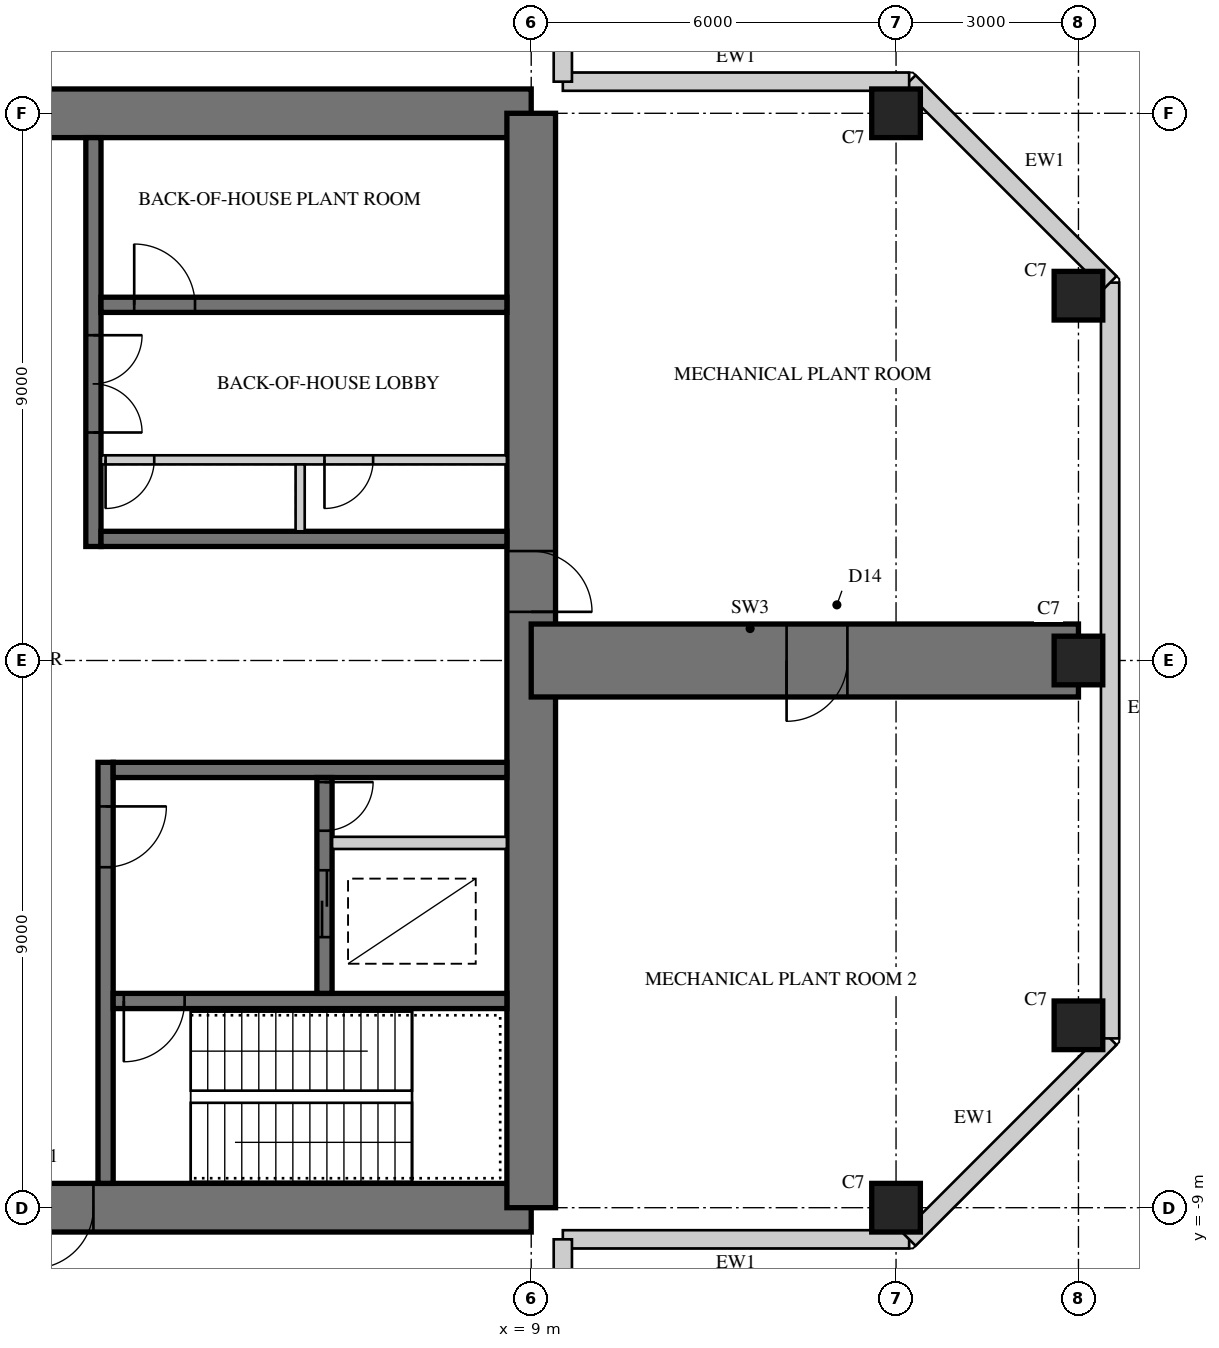
"""IFC4 building model, lengths in metres.
Left out: names, types, materials, properties, quantities, classifications, styles, units other than length and angle.
Written with IfcOpenShell. Run it as: python <this file> out.ifc"""

import sys

from ifc_helpers import new_model, si_unit, direction, frame, frame_2d, origin, origin_2d, place, context, subcontext, project, spatial, rectangle, extrude, element, fill, save


model = new_model("IFC4")
c1 = context("Model", 3, precision=1e-05, world=origin(), true_north=direction((0.0, 1.0)))
c2 = subcontext(c1, "Body", "Model", "MODEL_VIEW")
j1 = project(units=[si_unit("LENGTHUNIT", "METRE"), si_unit("PLANEANGLEUNIT", "RADIAN")], contexts=[c1])
p1 = place(None, origin())
s1 = spatial("IfcSite", under=j1, at=p1, CompositionType="ELEMENT")
p2 = place(p1, origin())
s2 = spatial("IfcBuilding", under=s1, at=p2, CompositionType="ELEMENT")
p3 = place(p2, frame((0.0, 0.0, 252.7)))
s3 = spatial("IfcBuildingStorey", under=s2, at=p3, CompositionType="ELEMENT", Elevation=252.7)
p4 = place(p3, frame((9.0, 9.0, 0.0), z_axis=(0.0, 0.0, 1.0), x_axis=(-1.0, 0.0, 0.0)))
e1 = element("IfcWall", 1, at=p4, inside=s3, PredefinedType="SHEAR", context=c2, shape_type="SweptSolid", body=[
    extrude(rectangle(XDim=18.0, YDim=0.8, at=frame_2d((9.0, 0.0))), origin(), (0.0, 0.0, 1.0), 5.0),
])
p5 = place(p4, frame((9.8, 0.0, 0.0)))
e2 = element("IfcOpeningElement", 2, at=p5, cuts=e1, PredefinedType="OPENING", context=c2, shape_type="SweptSolid", body=[
    extrude(rectangle(XDim=1.0, YDim=2.4, at=frame_2d((0.5, 1.2))), frame((0.0, 0.41, 0.0), z_axis=(0.0, -1.0, 0.0), x_axis=(1.0, 0.0, 0.0)), (0.0, 0.0, 1.0), 0.82),
])
p6 = place(p3, frame((-9.0, -9.0, 0.0), z_axis=(0.0, 0.0, 1.0), x_axis=(1.0, 0.0, 0.0)))
e3 = element("IfcWall", 3, at=p6, inside=s3, PredefinedType="SHEAR", context=c2, shape_type="SweptSolid", body=[
    extrude(rectangle(XDim=18.0, YDim=0.8, at=frame_2d((9.0, 0.0))), origin(), (0.0, 0.0, 1.0), 5.0),
])
p7 = place(p6, frame((9.8, 0.0, 0.0)))
e4 = element("IfcOpeningElement", 4, at=p7, cuts=e3, PredefinedType="OPENING", context=c2, shape_type="SweptSolid", body=[
    extrude(rectangle(XDim=1.0, YDim=2.4, at=frame_2d((0.5, 1.2))), frame((0.0, 0.41, 0.0), z_axis=(0.0, -1.0, 0.0), x_axis=(1.0, 0.0, 0.0)), (0.0, 0.0, 1.0), 0.82),
])
p8 = place(p3, frame((9.0, -9.0, 0.0), z_axis=(0.0, 0.0, 1.0), x_axis=(0.0, 1.0, 0.0)))
e5 = element("IfcWall", 5, at=p8, inside=s3, PredefinedType="SHEAR", context=c2, shape_type="SweptSolid", body=[
    extrude(rectangle(XDim=18.0, YDim=0.8, at=frame_2d((9.0, 0.0))), origin(), (0.0, 0.0, 1.0), 5.0),
])
p9 = place(p8, frame((9.8, 0.0, 0.0)))
e6 = element("IfcOpeningElement", 6, at=p9, cuts=e5, PredefinedType="OPENING", context=c2, shape_type="SweptSolid", body=[
    extrude(rectangle(XDim=1.0, YDim=2.4, at=frame_2d((0.5, 1.2))), frame((0.0, 0.41, 0.0), z_axis=(0.0, -1.0, 0.0), x_axis=(1.0, 0.0, 0.0)), (0.0, 0.0, 1.0), 0.82),
])
p10 = place(p3, frame((1.8, 1.875, 0.0), z_axis=(0.0, 0.0, 1.0), x_axis=(0.0, 1.0, 0.0)))
e7 = element("IfcWall", 7, at=p10, inside=s3, PredefinedType="SHEAR", context=c2, shape_type="SweptSolid", body=[
    extrude(rectangle(XDim=6.725, YDim=0.25, at=frame_2d((3.363, 0.0))), origin(), (0.0, 0.0, 1.0), 5.0),
])
p11 = place(p10, frame((1.875, 0.0, 0.0)))
e8 = element("IfcOpeningElement", 8, at=p11, cuts=e7, PredefinedType="OPENING", context=c2, shape_type="SweptSolid", body=[
    extrude(rectangle(XDim=1.6, YDim=2.4, at=frame_2d((0.8, 1.2))), frame((0.0, 0.135, 0.0), z_axis=(0.0, -1.0, 0.0), x_axis=(1.0, 0.0, 0.0)), (0.0, 0.0, 1.0), 0.27),
])
p12 = place(p3, frame((1.925, 2.0, 0.0), z_axis=(0.0, 0.0, 1.0), x_axis=(1.0, 0.0, 0.0)))
e9 = element("IfcWall", 9, at=p12, inside=s3, PredefinedType="SHEAR", context=c2, shape_type="SweptSolid", body=[
    extrude(rectangle(XDim=6.675, YDim=0.25, at=frame_2d((3.337, 0.0))), origin(), (0.0, 0.0, 1.0), 5.0),
])
p13 = place(p3, frame((1.925, 5.85, 0.0), z_axis=(0.0, 0.0, 1.0), x_axis=(1.0, 0.0, 0.0)))
e10 = element("IfcWall", 10, at=p13, inside=s3, PredefinedType="SHEAR", context=c2, shape_type="SweptSolid", body=[
    extrude(rectangle(XDim=6.675, YDim=0.25, at=frame_2d((3.337, 0.0))), origin(), (0.0, 0.0, 1.0), 5.0),
])
p14 = place(p13, frame((0.546, 0.0, 0.0)))
e11 = element("IfcOpeningElement", 11, at=p14, cuts=e10, PredefinedType="OPENING", context=c2, shape_type="SweptSolid", body=[
    extrude(rectangle(XDim=1.0, YDim=2.1, at=frame_2d((0.5, 1.05))), frame((0.0, 0.135, 0.0), z_axis=(0.0, -1.0, 0.0), x_axis=(1.0, 0.0, 0.0)), (0.0, 0.0, 1.0), 0.27),
])
p15 = place(p3, frame((1.925, 3.3, 0.0), z_axis=(0.0, 0.0, 1.0), x_axis=(1.0, 0.0, 0.0)))
e12 = element("IfcWall", 12, at=p15, inside=s3, PredefinedType="PARTITIONING", context=c2, shape_type="SweptSolid", body=[
    extrude(rectangle(XDim=6.675, YDim=0.15, at=frame_2d((3.337, 0.0))), origin(), (0.0, 0.0, 1.0), 5.0),
])
p16 = place(p15, frame((0.075, 0.0, 0.0)))
e13 = element("IfcOpeningElement", 13, at=p16, cuts=e12, PredefinedType="OPENING", context=c2, shape_type="SweptSolid", body=[
    extrude(rectangle(XDim=0.8, YDim=2.1, at=frame_2d((0.4, 1.05))), frame((0.0, 0.085, 0.0), z_axis=(0.0, -1.0, 0.0), x_axis=(1.0, 0.0, 0.0)), (0.0, 0.0, 1.0), 0.17),
])
p17 = place(p15, frame((3.675, 0.0, 0.0)))
e14 = element("IfcOpeningElement", 14, at=p17, cuts=e12, PredefinedType="OPENING", context=c2, shape_type="SweptSolid", body=[
    extrude(rectangle(XDim=0.8, YDim=2.1, at=frame_2d((0.4, 1.05))), frame((0.0, 0.085, 0.0), z_axis=(0.0, -1.0, 0.0), x_axis=(1.0, 0.0, 0.0)), (0.0, 0.0, 1.0), 0.17),
])
p18 = place(p3, frame((5.2, 2.125, 0.0), z_axis=(0.0, 0.0, 1.0), x_axis=(0.0, 1.0, 0.0)))
e15 = element("IfcWall", 15, at=p18, inside=s3, PredefinedType="PARTITIONING", context=c2, shape_type="SweptSolid", body=[
    extrude(rectangle(XDim=1.1, YDim=0.15, at=frame_2d((0.55, 0.0))), origin(), (0.0, 0.0, 1.0), 5.0),
])
p19 = place(p3, frame((2.0, -1.675, 0.0), z_axis=(0.0, 0.0, 1.0), x_axis=(0.0, -1.0, 0.0)))
e16 = element("IfcWall", 16, at=p19, inside=s3, PredefinedType="SHEAR", context=c2, shape_type="SweptSolid", body=[
    extrude(rectangle(XDim=6.925, YDim=0.25, at=frame_2d((3.462, 0.0))), origin(), (0.0, 0.0, 1.0), 5.0),
])
p20 = place(p19, frame((0.725, 0.0, 0.0)))
e17 = element("IfcOpeningElement", 17, at=p20, cuts=e16, PredefinedType="OPENING", context=c2, shape_type="SweptSolid", body=[
    extrude(rectangle(XDim=1.0, YDim=2.1, at=frame_2d((0.5, 1.05))), frame((0.0, 0.135, 0.0), z_axis=(0.0, -1.0, 0.0), x_axis=(1.0, 0.0, 0.0)), (0.0, 0.0, 1.0), 0.27),
])
p21 = place(p3, frame((2.125, -1.8, 0.0), z_axis=(0.0, 0.0, 1.0), x_axis=(1.0, 0.0, 0.0)))
e18 = element("IfcWall", 18, at=p21, inside=s3, PredefinedType="SHEAR", context=c2, shape_type="SweptSolid", body=[
    extrude(rectangle(XDim=6.475, YDim=0.25, at=frame_2d((3.238, 0.0))), origin(), (0.0, 0.0, 1.0), 5.0),
])
p22 = place(p3, frame((2.125, -5.6, 0.0), z_axis=(0.0, 0.0, 1.0), x_axis=(1.0, 0.0, 0.0)))
e19 = element("IfcWall", 19, at=p22, inside=s3, PredefinedType="SHEAR", context=c2, shape_type="SweptSolid", body=[
    extrude(rectangle(XDim=6.475, YDim=0.25, at=frame_2d((3.238, 0.0))), origin(), (0.0, 0.0, 1.0), 5.0),
])
p23 = place(p22, frame((0.175, 0.0, 0.0)))
e20 = element("IfcOpeningElement", 20, at=p23, cuts=e19, PredefinedType="OPENING", context=c2, shape_type="SweptSolid", body=[
    extrude(rectangle(XDim=1.0, YDim=2.1, at=frame_2d((0.5, 1.05))), frame((0.0, 0.135, 0.0), z_axis=(0.0, -1.0, 0.0), x_axis=(1.0, 0.0, 0.0)), (0.0, 0.0, 1.0), 0.27),
])
p24 = place(p3, frame((5.6, -1.925, 0.0), z_axis=(0.0, 0.0, 1.0), x_axis=(0.0, -1.0, 0.0)))
e21 = element("IfcWall", 21, at=p24, inside=s3, PredefinedType="SHEAR", context=c2, shape_type="SweptSolid", body=[
    extrude(rectangle(XDim=3.55, YDim=0.25, at=frame_2d((1.775, 0.0))), origin(), (0.0, 0.0, 1.0), 5.0),
])
p25 = place(p24, frame((1.525, 0.0, 0.0)))
e22 = element("IfcOpeningElement", 22, at=p25, cuts=e21, PredefinedType="OPENING", context=c2, shape_type="SweptSolid", body=[
    extrude(rectangle(XDim=1.1, YDim=2.2, at=frame_2d((0.55, 1.1))), frame((0.0, 0.135, 0.0), z_axis=(0.0, -1.0, 0.0), x_axis=(1.0, 0.0, 0.0)), (0.0, 0.0, 1.0), 0.27),
])
p26 = place(p24, frame((0.075, 0.0, 0.0)))
e23 = element("IfcOpeningElement", 23, at=p26, cuts=e21, PredefinedType="OPENING", context=c2, shape_type="SweptSolid", body=[
    extrude(rectangle(XDim=0.8, YDim=2.1, at=frame_2d((0.4, 1.05))), frame((0.0, 0.135, 0.0), z_axis=(0.0, -1.0, 0.0), x_axis=(1.0, 0.0, 0.0)), (0.0, 0.0, 1.0), 0.27),
])
p27 = place(p3, frame((5.725, -3.0, 0.0), z_axis=(0.0, 0.0, 1.0), x_axis=(1.0, 0.0, 0.0)))
e24 = element("IfcWall", 24, at=p27, inside=s3, PredefinedType="PARTITIONING", context=c2, shape_type="SweptSolid", body=[
    extrude(rectangle(XDim=2.875, YDim=0.2, at=frame_2d((1.438, 0.0))), origin(), (0.0, 0.0, 1.0), 5.0),
])
p28 = place(p3, frame((9.0, 0.0, 0.0), z_axis=(0.0, 0.0, 1.0), x_axis=(1.0, 0.0, 0.0)))
e25 = element("IfcWall", 25, at=p28, inside=s3, PredefinedType="SHEAR", context=c2, shape_type="SweptSolid", body=[
    extrude(rectangle(XDim=9.0, YDim=1.2, at=frame_2d((4.5, 0.0))), origin(), (0.0, 0.0, 1.0), 5.0),
])
p29 = place(p28, frame((4.2, 0.0, 0.0)))
e26 = element("IfcOpeningElement", 26, at=p29, cuts=e25, PredefinedType="OPENING", context=c2, shape_type="SweptSolid", body=[
    extrude(rectangle(XDim=1.0, YDim=2.2, at=frame_2d((0.5, 1.1))), frame((0.0, 0.61, 0.0), z_axis=(0.0, -1.0, 0.0), x_axis=(1.0, 0.0, 0.0)), (0.0, 0.0, 1.0), 1.22),
])
for number, where, z_axis, x_axis in (
    (27, (15.0, -9.0, 0.0), (0.0, 0.0, 1.0), (1.0, 0.0, 0.0)),
    (28, (15.0, 9.0, 0.0), (0.0, 0.0, 1.0), (1.0, 0.0, 0.0)),
    (29, (18.0, -6.0, 0.0), (0.0, 0.0, 1.0), (1.0, 0.0, 0.0)),
    (30, (18.0, 0.0, 0.0), (0.0, 0.0, 1.0), (1.0, 0.0, 0.0)),
    (31, (18.0, 6.0, 0.0), (0.0, 0.0, 1.0), (1.0, 0.0, 0.0)),
):
    element("IfcColumn", number, at=place(p3, frame(where, z_axis=z_axis, x_axis=x_axis)), inside=s3, PredefinedType="COLUMN", context=c2, shape_type="SweptSolid", body=[
        extrude(rectangle(XDim=0.8, YDim=0.8, at=origin_2d()), origin(), (0.0, 0.0, 1.0), 5.0),
    ])
p30 = place(p3, frame((9.52, -9.52, 0.0), z_axis=(0.0, 0.0, 1.0), x_axis=(1.0, 0.0, 0.0)))
e32 = element("IfcWall", 32, at=p30, inside=s3, PredefinedType="SOLIDWALL", context=c2, shape_type="SweptSolid", body=[
    extrude(rectangle(XDim=5.695, YDim=0.3, at=frame_2d((2.848, 0.0))), origin(), (0.0, 0.0, 1.0), 4.82),
])
p31 = place(p3, frame((15.215, -9.52, 0.0), z_axis=(0.0, 0.0, 1.0), x_axis=(0.707106781187, 0.707106781187, 0.0)))
e33 = element("IfcWall", 33, at=p31, inside=s3, PredefinedType="SOLIDWALL", context=c2, shape_type="SweptSolid", body=[
    extrude(rectangle(XDim=4.674, YDim=0.3, at=frame_2d((2.337, 0.0))), origin(), (0.0, 0.0, 1.0), 4.82),
])
p32 = place(p3, frame((18.52, -6.215, 0.0), z_axis=(0.0, 0.0, 1.0), x_axis=(0.0, 1.0, 0.0)))
e34 = element("IfcWall", 34, at=p32, inside=s3, PredefinedType="SOLIDWALL", context=c2, shape_type="SweptSolid", body=[
    extrude(rectangle(XDim=12.431, YDim=0.3, at=frame_2d((6.215, 0.0))), origin(), (0.0, 0.0, 1.0), 4.82),
])
p33 = place(p3, frame((18.52, 6.215, 0.0), z_axis=(0.0, 0.0, 1.0), x_axis=(-0.707106781187, 0.707106781187, 0.0)))
e35 = element("IfcWall", 35, at=p33, inside=s3, PredefinedType="SOLIDWALL", context=c2, shape_type="SweptSolid", body=[
    extrude(rectangle(XDim=4.674, YDim=0.3, at=frame_2d((2.337, 0.0))), origin(), (0.0, 0.0, 1.0), 4.82),
])
for number, where, z_axis, x_axis in (
    (36, (15.215, 9.52, 0.0), (0.0, 0.0, 1.0), (-1.0, 0.0, 0.0)),
    (37, (9.52, 9.52, 0.0), (0.0, 0.0, 1.0), (0.0, 1.0, 0.0)),
    (38, (9.52, -15.215, 0.0), (0.0, 0.0, 1.0), (0.0, 1.0, 0.0)),
):
    element("IfcWall", number, at=place(p3, frame(where, z_axis=z_axis, x_axis=x_axis)), inside=s3, PredefinedType="SOLIDWALL", context=c2, shape_type="SweptSolid", body=[
        extrude(rectangle(XDim=5.695, YDim=0.3, at=frame_2d((2.848, 0.0))), origin(), (0.0, 0.0, 1.0), 4.82),
    ])
p34 = place(p29, frame((1.0, 0.0, 0.0), z_axis=(0.0, 0.0, 1.0), x_axis=(-1.0, 0.0, 0.0)))
e39 = element("IfcDoor", 39, at=p34, inside=s3, OperationType="SINGLE_SWING_RIGHT", PredefinedType="DOOR", context=c2, shape_type="SweptSolid", body=[
    extrude(rectangle(XDim=1.0, YDim=2.2, at=frame_2d((0.5, 1.1))), frame((0.0, 0.025, 0.0), z_axis=(0.0, -1.0, 0.0), x_axis=(1.0, 0.0, 0.0)), (0.0, 0.0, 1.0), 0.05),
])
fill(e26, e39)
p35 = place(p7, frame((1.0, 0.0, 0.0), z_axis=(0.0, 0.0, 1.0), x_axis=(-1.0, 0.0, 0.0)))
e40 = element("IfcDoor", 40, at=p35, inside=s3, OperationType="SINGLE_SWING_RIGHT", PredefinedType="DOOR", context=c2, shape_type="SweptSolid", body=[
    extrude(rectangle(XDim=1.0, YDim=2.4, at=frame_2d((0.5, 1.2))), frame((0.0, -0.005, 0.0), z_axis=(0.0, -1.0, 0.0), x_axis=(1.0, 0.0, 0.0)), (0.0, 0.0, 1.0), 0.05),
])
fill(e4, e40)
p36 = place(p9, frame((1.0, 0.0, 0.0), z_axis=(0.0, 0.0, 1.0), x_axis=(-1.0, 0.0, 0.0)))
e41 = element("IfcDoor", 41, at=p36, inside=s3, OperationType="SINGLE_SWING_RIGHT", PredefinedType="DOOR", context=c2, shape_type="SweptSolid", body=[
    extrude(rectangle(XDim=1.0, YDim=2.4, at=frame_2d((0.5, 1.2))), frame((0.0, -0.005, 0.0), z_axis=(0.0, -1.0, 0.0), x_axis=(1.0, 0.0, 0.0)), (0.0, 0.0, 1.0), 0.05),
])
fill(e6, e41)
p37 = place(p11, frame((1.6, 0.0, 0.0), z_axis=(0.0, 0.0, 1.0), x_axis=(-1.0, 0.0, 0.0)))
e42 = element("IfcDoor", 42, at=p37, inside=s3, OperationType="DOUBLE_DOOR_SINGLE_SWING", PredefinedType="DOOR", context=c2, shape_type="SweptSolid", body=[
    extrude(rectangle(XDim=1.6, YDim=2.4, at=frame_2d((0.8, 1.2))), frame((0.0, 0.025, 0.0), z_axis=(0.0, -1.0, 0.0), x_axis=(1.0, 0.0, 0.0)), (0.0, 0.0, 1.0), 0.05),
])
fill(e8, e42)
p38 = place(p16, frame((0.8, 0.0, 0.0), z_axis=(0.0, 0.0, 1.0), x_axis=(-1.0, 0.0, 0.0)))
e43 = element("IfcDoor", 43, at=p38, inside=s3, OperationType="SINGLE_SWING_RIGHT", PredefinedType="DOOR", context=c2, shape_type="SweptSolid", body=[
    extrude(rectangle(XDim=0.8, YDim=2.1, at=frame_2d((0.4, 1.05))), frame((0.0, 0.025, 0.0), z_axis=(0.0, -1.0, 0.0), x_axis=(1.0, 0.0, 0.0)), (0.0, 0.0, 1.0), 0.05),
])
fill(e13, e43)
p39 = place(p17, frame((0.8, 0.0, 0.0), z_axis=(0.0, 0.0, 1.0), x_axis=(-1.0, 0.0, 0.0)))
e44 = element("IfcDoor", 44, at=p39, inside=s3, OperationType="SINGLE_SWING_RIGHT", PredefinedType="DOOR", context=c2, shape_type="SweptSolid", body=[
    extrude(rectangle(XDim=0.8, YDim=2.1, at=frame_2d((0.4, 1.05))), frame((0.0, 0.025, 0.0), z_axis=(0.0, -1.0, 0.0), x_axis=(1.0, 0.0, 0.0)), (0.0, 0.0, 1.0), 0.05),
])
fill(e14, e44)
p40 = place(p20, origin())
e45 = element("IfcDoor", 45, at=p40, inside=s3, OperationType="SINGLE_SWING_LEFT", PredefinedType="DOOR", context=c2, shape_type="SweptSolid", body=[
    extrude(rectangle(XDim=1.0, YDim=2.1, at=frame_2d((0.5, 1.05))), frame((0.0, 0.025, 0.0), z_axis=(0.0, -1.0, 0.0), x_axis=(1.0, 0.0, 0.0)), (0.0, 0.0, 1.0), 0.05),
])
fill(e17, e45)
p41 = place(p23, frame((1.0, 0.0, 0.0), z_axis=(0.0, 0.0, 1.0), x_axis=(-1.0, 0.0, 0.0)))
e46 = element("IfcDoor", 46, at=p41, inside=s3, OperationType="SINGLE_SWING_RIGHT", PredefinedType="DOOR", context=c2, shape_type="SweptSolid", body=[
    extrude(rectangle(XDim=1.0, YDim=2.1, at=frame_2d((0.5, 1.05))), frame((0.0, 0.025, 0.0), z_axis=(0.0, -1.0, 0.0), x_axis=(1.0, 0.0, 0.0)), (0.0, 0.0, 1.0), 0.05),
])
fill(e20, e46)
p42 = place(p25, origin())
e47 = element("IfcDoor", 47, at=p42, inside=s3, OperationType="DOUBLE_DOOR_SLIDING", PredefinedType="DOOR", context=c2, shape_type="SweptSolid", body=[
    extrude(rectangle(XDim=1.1, YDim=2.2, at=frame_2d((0.55, 1.1))), frame((0.0, 0.025, 0.0), z_axis=(0.0, -1.0, 0.0), x_axis=(1.0, 0.0, 0.0)), (0.0, 0.0, 1.0), 0.05),
])
fill(e22, e47)
p43 = place(p26, origin())
e48 = element("IfcDoor", 48, at=p43, inside=s3, OperationType="SINGLE_SWING_LEFT", PredefinedType="DOOR", context=c2, shape_type="SweptSolid", body=[
    extrude(rectangle(XDim=0.8, YDim=2.1, at=frame_2d((0.4, 1.05))), frame((0.0, 0.025, 0.0), z_axis=(0.0, -1.0, 0.0), x_axis=(1.0, 0.0, 0.0)), (0.0, 0.0, 1.0), 0.05),
])
fill(e23, e48)
p44 = place(p14, origin())
e49 = element("IfcDoor", 49, at=p44, inside=s3, OperationType="SINGLE_SWING_LEFT", PredefinedType="DOOR", context=c2, shape_type="SweptSolid", body=[
    extrude(rectangle(XDim=1.0, YDim=2.1, at=frame_2d((0.5, 1.05))), frame((0.0, 0.025, 0.0), z_axis=(0.0, -1.0, 0.0), x_axis=(1.0, 0.0, 0.0)), (0.0, 0.0, 1.0), 0.05),
])
fill(e11, e49)
save(model, sys.argv[1])
